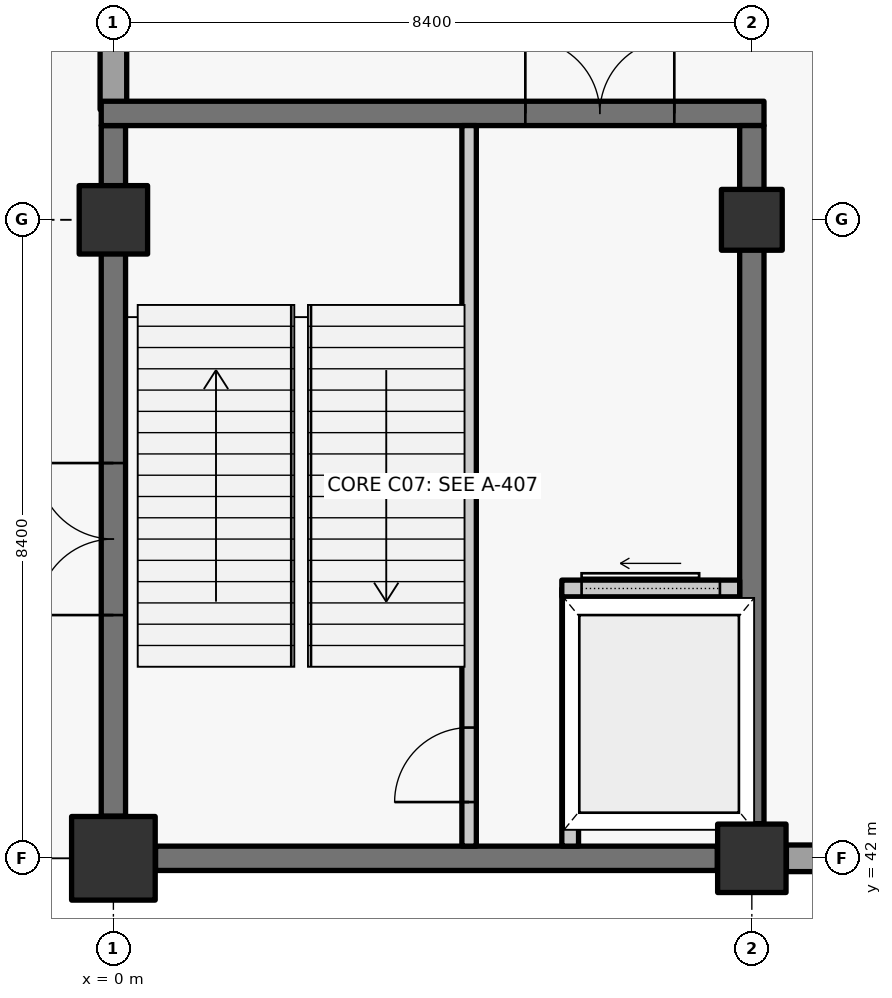
"""IFC4 building model, lengths in metres.
Left out: names, types, materials, properties, quantities, classifications, styles, units other than length and angle.
Written with IfcOpenShell. Run it as: python <this file> out.ifc"""

import sys

from ifc_helpers import new_model, si_unit, direction, frame, frame_2d, origin, origin_2d, place, context, subcontext, project, spatial, rectangle, extrude, element, fill, save


model = new_model("IFC4")
c1 = context("Model", 3, precision=1e-05, world=origin(), true_north=direction((0.0, 1.0)))
c2 = subcontext(c1, "Body", "Model", "MODEL_VIEW")
j1 = project(units=[si_unit("LENGTHUNIT", "METRE"), si_unit("PLANEANGLEUNIT", "RADIAN")], contexts=[c1])
p1 = place(None, origin())
s1 = spatial("IfcSite", under=j1, at=p1, CompositionType="ELEMENT")
p2 = place(p1, origin())
s2 = spatial("IfcBuilding", under=s1, at=p2, CompositionType="ELEMENT")
p3 = place(p2, origin())
s3 = spatial("IfcBuildingStorey", under=s2, at=p3, CompositionType="ELEMENT", Elevation=0.0)
p4 = place(p3, frame((0.0, 42.0, -0.36), z_axis=(0.0, 0.0, 1.0), x_axis=(1.0, 0.0, 0.0)))
e1 = element("IfcColumn", 1, at=p4, inside=s3, PredefinedType="COLUMN", context=c2, shape_type="SweptSolid", body=[
    extrude(rectangle(XDim=1.1, YDim=1.1, at=origin_2d()), origin(), (0.0, 0.0, 1.0), 6.36),
])
for number, where, z_axis, x_axis in (
    (2, (0.0, 50.4, -0.36), (0.0, 0.0, 1.0), (1.0, 0.0, 0.0)),
    (3, (8.4, 42.0, -0.36), (0.0, 0.0, 1.0), (1.0, 0.0, 0.0)),
):
    element("IfcColumn", number, at=place(p3, frame(where, z_axis=z_axis, x_axis=x_axis)), inside=s3, PredefinedType="COLUMN", context=c2, shape_type="SweptSolid", body=[
        extrude(rectangle(XDim=0.9, YDim=0.9, at=origin_2d()), origin(), (0.0, 0.0, 1.0), 6.36),
    ])
p5 = place(p3, frame((8.4, 50.4, -0.36), z_axis=(0.0, 0.0, 1.0), x_axis=(1.0, 0.0, 0.0)))
e4 = element("IfcColumn", 4, at=p5, inside=s3, PredefinedType="COLUMN", context=c2, shape_type="SweptSolid", body=[
    extrude(rectangle(XDim=0.8, YDim=0.8, at=origin_2d()), origin(), (0.0, 0.0, 1.0), 6.36),
])
p6 = place(p3, frame((0.0, 51.85, 0.0), z_axis=(0.0, 0.0, 1.0), x_axis=(0.0, 1.0, 0.0)))
e5 = element("IfcWall", 5, at=p6, inside=s3, PredefinedType="SOLIDWALL", context=c2, shape_type="SweptSolid", body=[
    extrude(rectangle(XDim=6.495, YDim=0.35, at=frame_2d((3.248, 0.0))), origin(), (0.0, 0.0, 1.0), 5.23),
])
p7 = place(p6, frame((2.035, 0.0, 0.0)))
e6 = element("IfcOpeningElement", 6, at=p7, cuts=e5, PredefinedType="OPENING", context=c2, shape_type="SweptSolid", body=[
    extrude(rectangle(XDim=2.4, YDim=2.6, at=frame_2d((1.2, 1.3))), frame((0.0, 0.185, 0.0), z_axis=(0.0, -1.0, 0.0), x_axis=(1.0, 0.0, 0.0)), (0.0, 0.0, 1.0), 0.37),
])
p8 = place(p3, frame((16.345, 42.0, 0.0), z_axis=(0.0, 0.0, 1.0), x_axis=(-1.0, 0.0, 0.0)))
e7 = element("IfcWall", 7, at=p8, inside=s3, PredefinedType="SOLIDWALL", context=c2, shape_type="SweptSolid", body=[
    extrude(rectangle(XDim=7.49, YDim=0.35, at=frame_2d((3.745, 0.0))), origin(), (0.0, 0.0, 1.0), 5.23),
])
p9 = place(p8, frame((2.785, 0.0, 0.0)))
e8 = element("IfcOpeningElement", 8, at=p9, cuts=e7, PredefinedType="OPENING", context=c2, shape_type="SweptSolid", body=[
    extrude(rectangle(XDim=1.92, YDim=2.32, at=frame_2d((0.96, 1.16))), frame((0.0, 0.185, 0.0), z_axis=(0.0, -1.0, 0.0), x_axis=(1.0, 0.0, 0.0)), (0.0, 0.0, 1.0), 0.37),
])
p10 = place(p3, frame((7.945, 42.0, -0.36), z_axis=(0.0, 0.0, 1.0), x_axis=(-1.0, 0.0, 0.0)))
e9 = element("IfcWall", 9, at=p10, inside=s3, PredefinedType="SHEAR", context=c2, shape_type="SweptSolid", body=[
    extrude(rectangle(XDim=7.39, YDim=0.32, at=frame_2d((3.695, 0.0))), origin(), (0.0, 0.0, 1.0), 6.08),
])
p11 = place(p3, frame((0.0, 42.555, -0.36), z_axis=(0.0, 0.0, 1.0), x_axis=(0.0, 1.0, 0.0)))
e10 = element("IfcWall", 10, at=p11, inside=s3, PredefinedType="SHEAR", context=c2, shape_type="SweptSolid", body=[
    extrude(rectangle(XDim=9.085, YDim=0.32, at=frame_2d((4.542, 0.0))), origin(), (0.0, 0.0, 1.0), 6.08),
])
p12 = place(p11, frame((2.645, 0.0, 0.36)))
e11 = element("IfcOpeningElement", 11, at=p12, cuts=e10, PredefinedType="OPENING", context=c2, shape_type="SweptSolid", body=[
    extrude(rectangle(XDim=2.0, YDim=2.28, at=frame_2d((1.0, 1.14))), frame((0.0, 0.17, 0.0), z_axis=(0.0, -1.0, 0.0), x_axis=(1.0, 0.0, 0.0)), (0.0, 0.0, 1.0), 0.34),
])
p13 = place(p3, frame((-0.16, 51.8, -0.36), z_axis=(0.0, 0.0, 1.0), x_axis=(1.0, 0.0, 0.0)))
e12 = element("IfcWall", 12, at=p13, inside=s3, PredefinedType="SHEAR", context=c2, shape_type="SweptSolid", body=[
    extrude(rectangle(XDim=8.72, YDim=0.32, at=frame_2d((4.36, 0.0))), origin(), (0.0, 0.0, 1.0), 6.08),
])
p14 = place(p13, frame((5.58, 0.0, 0.36)))
e13 = element("IfcOpeningElement", 13, at=p14, cuts=e12, PredefinedType="OPENING", context=c2, shape_type="SweptSolid", body=[
    extrude(rectangle(XDim=1.96, YDim=2.2, at=frame_2d((0.98, 1.1))), frame((0.0, 0.17, 0.0), z_axis=(0.0, -1.0, 0.0), x_axis=(1.0, 0.0, 0.0)), (0.0, 0.0, 1.0), 0.34),
])
p15 = place(p3, frame((8.4, 51.64, -0.36), z_axis=(0.0, 0.0, 1.0), x_axis=(0.0, -1.0, 0.0)))
e14 = element("IfcWall", 14, at=p15, inside=s3, PredefinedType="SHEAR", context=c2, shape_type="SweptSolid", body=[
    extrude(rectangle(XDim=9.185, YDim=0.32, at=frame_2d((4.592, 0.0))), origin(), (0.0, 0.0, 1.0), 6.08),
])
p16 = place(p3, frame((4.68, 42.16, -0.36), z_axis=(0.0, 0.0, 1.0), x_axis=(0.0, 1.0, 0.0)))
e15 = element("IfcWall", 15, at=p16, inside=s3, PredefinedType="SOLIDWALL", context=c2, shape_type="SweptSolid", body=[
    extrude(rectangle(XDim=9.48, YDim=0.19, at=frame_2d((4.74, 0.0))), origin(), (0.0, 0.0, 1.0), 6.08),
])
p17 = place(p16, frame((0.58, 0.0, 0.36)))
e16 = element("IfcOpeningElement", 16, at=p17, cuts=e15, PredefinedType="OPENING", context=c2, shape_type="SweptSolid", body=[
    extrude(rectangle(XDim=0.98, YDim=2.15, at=frame_2d((0.49, 1.075))), frame((0.0, 0.105, 0.0), z_axis=(0.0, -1.0, 0.0), x_axis=(1.0, 0.0, 0.0)), (0.0, 0.0, 1.0), 0.21),
])
p18 = place(p3, frame((6.01, 42.16, 0.0), z_axis=(0.0, 0.0, 1.0), x_axis=(0.0, 1.0, 0.0)))
e17 = element("IfcWall", 17, at=p18, inside=s3, PredefinedType="SOLIDWALL", context=c2, shape_type="SweptSolid", body=[
    extrude(rectangle(XDim=3.39, YDim=0.22, at=frame_2d((1.695, 0.0))), origin(), (0.0, 0.0, 1.0), 5.72),
])
p19 = place(p3, frame((5.9, 45.55, 0.0), z_axis=(0.0, 0.0, 1.0), x_axis=(1.0, 0.0, 0.0)))
e18 = element("IfcWall", 18, at=p19, inside=s3, PredefinedType="SOLIDWALL", context=c2, shape_type="SweptSolid", body=[
    extrude(rectangle(XDim=2.34, YDim=0.22, at=frame_2d((1.17, 0.0))), origin(), (0.0, 0.0, 1.0), 5.72),
])
p20 = place(p19, frame((0.26, 0.0, 0.0)))
e19 = element("IfcOpeningElement", 19, at=p20, cuts=e18, PredefinedType="OPENING", context=c2, shape_type="SweptSolid", body=[
    extrude(rectangle(XDim=1.82, YDim=2.4, at=frame_2d((0.91, 1.2))), frame((0.0, 0.12, 0.0), z_axis=(0.0, -1.0, 0.0), x_axis=(1.0, 0.0, 0.0)), (0.0, 0.0, 1.0), 0.24),
])
p21 = place(p17, origin())
e20 = element("IfcDoor", 20, at=p21, inside=s3, OperationType="SINGLE_SWING_LEFT", PredefinedType="DOOR", context=c2, shape_type="SweptSolid", body=[
    extrude(rectangle(XDim=0.98, YDim=2.15, at=frame_2d((0.49, 1.075))), frame((0.0, 0.025, 0.0), z_axis=(0.0, -1.0, 0.0), x_axis=(1.0, 0.0, 0.0)), (0.0, 0.0, 1.0), 0.05),
])
fill(e16, e20)
p22 = place(p14, origin())
e21 = element("IfcDoor", 21, at=p22, inside=s3, OperationType="DOUBLE_DOOR_SINGLE_SWING", PredefinedType="DOOR", context=c2, shape_type="SweptSolid", body=[
    extrude(rectangle(XDim=1.96, YDim=2.2, at=frame_2d((0.98, 1.1))), frame((0.0, 0.025, 0.0), z_axis=(0.0, -1.0, 0.0), x_axis=(1.0, 0.0, 0.0)), (0.0, 0.0, 1.0), 0.05),
])
fill(e13, e21)
p23 = place(p12, origin())
e22 = element("IfcDoor", 22, at=p23, inside=s3, OperationType="DOUBLE_DOOR_SINGLE_SWING", PredefinedType="DOOR", context=c2, shape_type="SweptSolid", body=[
    extrude(rectangle(XDim=2.0, YDim=2.28, at=frame_2d((1.0, 1.14))), frame((0.0, 0.025, 0.0), z_axis=(0.0, -1.0, 0.0), x_axis=(1.0, 0.0, 0.0)), (0.0, 0.0, 1.0), 0.05),
])
fill(e11, e22)
p24 = place(p20, origin())
e23 = element("IfcDoor", 23, at=p24, inside=s3, OperationType="SLIDING_TO_LEFT", PredefinedType="DOOR", context=c2, shape_type="SweptSolid", body=[
    extrude(rectangle(XDim=1.82, YDim=2.4, at=frame_2d((0.91, 1.2))), frame((0.0, 0.025, 0.0), z_axis=(0.0, -1.0, 0.0), x_axis=(1.0, 0.0, 0.0)), (0.0, 0.0, 1.0), 0.05),
])
fill(e19, e23)
save(model, sys.argv[1])
